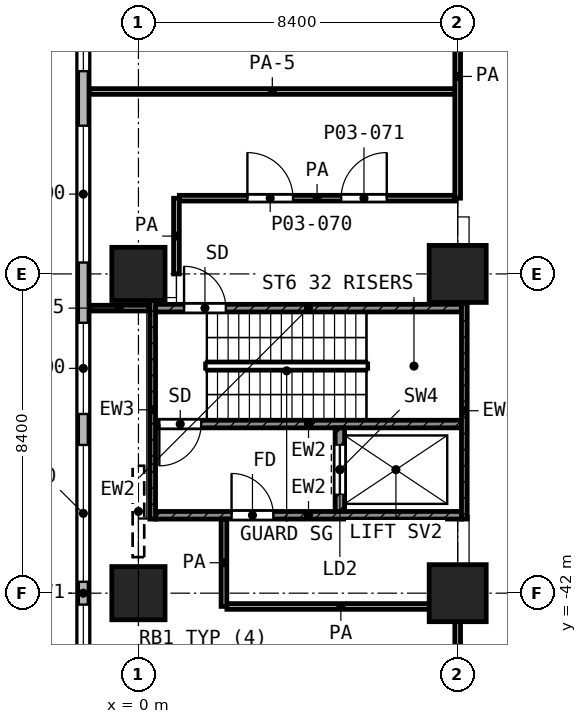
"""IFC4 building model, lengths in metres.
Left out: names, types, materials, properties, quantities, classifications, styles, units other than length and angle.
Written with IfcOpenShell. Run it as: python <this file> out.ifc"""

import sys

from ifc_helpers import new_model, si_unit, direction, frame, frame_2d, origin, origin_2d, place, context, subcontext, project, spatial, rectangle, extrude, element, fill, save


model = new_model("IFC4")
c1 = context("Model", 3, precision=1e-05, world=origin(), true_north=direction((0.0, 1.0)))
c2 = subcontext(c1, "Body", "Model", "MODEL_VIEW")
j1 = project(units=[si_unit("LENGTHUNIT", "METRE"), si_unit("PLANEANGLEUNIT", "RADIAN")], contexts=[c1])
p1 = place(None, origin())
s1 = spatial("IfcSite", under=j1, at=p1, CompositionType="ELEMENT")
p2 = place(p1, origin())
s2 = spatial("IfcBuilding", under=s1, at=p2, CompositionType="ELEMENT")
p3 = place(p2, frame((0.0, 0.0, 12.6)))
s3 = spatial("IfcBuildingStorey", under=s2, at=p3, CompositionType="ELEMENT", Elevation=12.6)
p4 = place(p3, frame((0.0, -33.6, 0.0), z_axis=(0.0, 0.0, 1.0), x_axis=(1.0, 0.0, 0.0)))
e1 = element("IfcColumn", 1, at=p4, inside=s3, PredefinedType="COLUMN", context=c2, shape_type="SweptSolid", body=[
    extrude(rectangle(XDim=1.4, YDim=1.4, at=origin_2d()), origin(), (0.0, 0.0, 1.0), 5.6),
])
p5 = place(p3, frame((8.4, -33.6, 0.0), z_axis=(0.0, 0.0, 1.0), x_axis=(1.0, 0.0, 0.0)))
e2 = element("IfcColumn", 2, at=p5, inside=s3, PredefinedType="COLUMN", context=c2, shape_type="SweptSolid", body=[
    extrude(rectangle(XDim=1.5, YDim=1.5, at=origin_2d()), origin(), (0.0, 0.0, 1.0), 5.6),
])
p6 = place(p3, frame((0.0, -42.0, 0.0), z_axis=(0.0, 0.0, 1.0), x_axis=(1.0, 0.0, 0.0)))
e3 = element("IfcColumn", 3, at=p6, inside=s3, PredefinedType="COLUMN", context=c2, shape_type="SweptSolid", body=[
    extrude(rectangle(XDim=1.4, YDim=1.4, at=origin_2d()), origin(), (0.0, 0.0, 1.0), 5.6),
])
p7 = place(p3, frame((8.4, -42.0, 0.0), z_axis=(0.0, 0.0, 1.0), x_axis=(1.0, 0.0, 0.0)))
e4 = element("IfcColumn", 4, at=p7, inside=s3, PredefinedType="COLUMN", context=c2, shape_type="SweptSolid", body=[
    extrude(rectangle(XDim=1.5, YDim=1.5, at=origin_2d()), origin(), (0.0, 0.0, 1.0), 5.6),
])
p8 = place(p3, frame((-1.45, -4.462, 0.0), z_axis=(0.0, 0.0, 1.0), x_axis=(0.0, -1.0, 0.0)))
e5 = element("IfcWall", 5, at=p8, inside=s3, PredefinedType="SOLIDWALL", context=c2, shape_type="SweptSolid", body=[
    extrude(rectangle(XDim=75.076, YDim=0.3, at=frame_2d((37.538, 0.0))), origin(), (0.0, 0.0, 1.0), 5.25),
])
p9 = place(p8, frame((0.738, 0.0, 0.9)))
e6 = element("IfcOpeningElement", 6, at=p9, cuts=e5, PredefinedType="OPENING", context=c2, shape_type="SweptSolid", body=[
    extrude(rectangle(XDim=2.4, YDim=3.0, at=frame_2d((1.2, 1.5))), frame((0.0, 0.16, 0.0), z_axis=(0.0, -1.0, 0.0), x_axis=(1.0, 0.0, 0.0)), (0.0, 0.0, 1.0), 0.32),
])
p10 = place(p8, frame((4.238, 0.0, 0.9)))
e7 = element("IfcOpeningElement", 7, at=p10, cuts=e5, PredefinedType="OPENING", context=c2, shape_type="SweptSolid", body=[
    extrude(rectangle(XDim=3.6, YDim=3.0, at=frame_2d((1.8, 1.5))), frame((0.0, 0.16, 0.0), z_axis=(0.0, -1.0, 0.0), x_axis=(1.0, 0.0, 0.0)), (0.0, 0.0, 1.0), 0.32),
])
p11 = place(p8, frame((8.438, 0.0, 0.9)))
e8 = element("IfcOpeningElement", 8, at=p11, cuts=e5, PredefinedType="OPENING", context=c2, shape_type="SweptSolid", body=[
    extrude(rectangle(XDim=3.6, YDim=3.0, at=frame_2d((1.8, 1.5))), frame((0.0, 0.16, 0.0), z_axis=(0.0, -1.0, 0.0), x_axis=(1.0, 0.0, 0.0)), (0.0, 0.0, 1.0), 0.32),
])
p12 = place(p8, frame((12.638, 0.0, 0.9)))
e9 = element("IfcOpeningElement", 9, at=p12, cuts=e5, PredefinedType="OPENING", context=c2, shape_type="SweptSolid", body=[
    extrude(rectangle(XDim=3.6, YDim=3.0, at=frame_2d((1.8, 1.5))), frame((0.0, 0.16, 0.0), z_axis=(0.0, -1.0, 0.0), x_axis=(1.0, 0.0, 0.0)), (0.0, 0.0, 1.0), 0.32),
])
p13 = place(p8, frame((16.838, 0.0, 0.9)))
e10 = element("IfcOpeningElement", 10, at=p13, cuts=e5, PredefinedType="OPENING", context=c2, shape_type="SweptSolid", body=[
    extrude(rectangle(XDim=3.6, YDim=3.0, at=frame_2d((1.8, 1.5))), frame((0.0, 0.16, 0.0), z_axis=(0.0, -1.0, 0.0), x_axis=(1.0, 0.0, 0.0)), (0.0, 0.0, 1.0), 0.32),
])
p14 = place(p8, frame((21.403, 0.0, 0.9)))
e11 = element("IfcOpeningElement", 11, at=p14, cuts=e5, PredefinedType="OPENING", context=c2, shape_type="SweptSolid", body=[
    extrude(rectangle(XDim=2.4, YDim=3.0, at=frame_2d((1.2, 1.5))), frame((0.0, 0.16, 0.0), z_axis=(0.0, -1.0, 0.0), x_axis=(1.0, 0.0, 0.0)), (0.0, 0.0, 1.0), 0.32),
])
p15 = place(p8, frame((25.238, 0.0, 0.9)))
e12 = element("IfcOpeningElement", 12, at=p15, cuts=e5, PredefinedType="OPENING", context=c2, shape_type="SweptSolid", body=[
    extrude(rectangle(XDim=3.6, YDim=3.0, at=frame_2d((1.8, 1.5))), frame((0.0, 0.16, 0.0), z_axis=(0.0, -1.0, 0.0), x_axis=(1.0, 0.0, 0.0)), (0.0, 0.0, 1.0), 0.32),
])
p16 = place(p8, frame((30.423, 0.0, 0.9)))
e13 = element("IfcOpeningElement", 13, at=p16, cuts=e5, PredefinedType="OPENING", context=c2, shape_type="SweptSolid", body=[
    extrude(rectangle(XDim=2.4, YDim=3.0, at=frame_2d((1.2, 1.5))), frame((0.0, 0.16, 0.0), z_axis=(0.0, -1.0, 0.0), x_axis=(1.0, 0.0, 0.0)), (0.0, 0.0, 1.0), 0.32),
])
p17 = place(p8, frame((33.638, 0.0, 0.9)))
e14 = element("IfcOpeningElement", 14, at=p17, cuts=e5, PredefinedType="OPENING", context=c2, shape_type="SweptSolid", body=[
    extrude(rectangle(XDim=3.6, YDim=3.0, at=frame_2d((1.8, 1.5))), frame((0.0, 0.16, 0.0), z_axis=(0.0, -1.0, 0.0), x_axis=(1.0, 0.0, 0.0)), (0.0, 0.0, 1.0), 0.32),
])
p18 = place(p8, frame((37.838, 0.0, 0.9)))
e15 = element("IfcOpeningElement", 15, at=p18, cuts=e5, PredefinedType="OPENING", context=c2, shape_type="SweptSolid", body=[
    extrude(rectangle(XDim=3.6, YDim=3.0, at=frame_2d((1.8, 1.5))), frame((0.0, 0.16, 0.0), z_axis=(0.0, -1.0, 0.0), x_axis=(1.0, 0.0, 0.0)), (0.0, 0.0, 1.0), 0.32),
])
p19 = place(p8, frame((42.038, 0.0, 0.9)))
e16 = element("IfcOpeningElement", 16, at=p19, cuts=e5, PredefinedType="OPENING", context=c2, shape_type="SweptSolid", body=[
    extrude(rectangle(XDim=3.6, YDim=3.0, at=frame_2d((1.8, 1.5))), frame((0.0, 0.16, 0.0), z_axis=(0.0, -1.0, 0.0), x_axis=(1.0, 0.0, 0.0)), (0.0, 0.0, 1.0), 0.32),
])
p20 = place(p8, frame((46.238, 0.0, 0.9)))
e17 = element("IfcOpeningElement", 17, at=p20, cuts=e5, PredefinedType="OPENING", context=c2, shape_type="SweptSolid", body=[
    extrude(rectangle(XDim=3.6, YDim=3.0, at=frame_2d((1.8, 1.5))), frame((0.0, 0.16, 0.0), z_axis=(0.0, -1.0, 0.0), x_axis=(1.0, 0.0, 0.0)), (0.0, 0.0, 1.0), 0.32),
])
p21 = place(p8, frame((50.438, 0.0, 0.9)))
e18 = element("IfcOpeningElement", 18, at=p21, cuts=e5, PredefinedType="OPENING", context=c2, shape_type="SweptSolid", body=[
    extrude(rectangle(XDim=3.6, YDim=3.0, at=frame_2d((1.8, 1.5))), frame((0.0, 0.16, 0.0), z_axis=(0.0, -1.0, 0.0), x_axis=(1.0, 0.0, 0.0)), (0.0, 0.0, 1.0), 0.32),
])
p22 = place(p8, frame((54.638, 0.0, 0.9)))
e19 = element("IfcOpeningElement", 19, at=p22, cuts=e5, PredefinedType="OPENING", context=c2, shape_type="SweptSolid", body=[
    extrude(rectangle(XDim=3.6, YDim=3.0, at=frame_2d((1.8, 1.5))), frame((0.0, 0.16, 0.0), z_axis=(0.0, -1.0, 0.0), x_axis=(1.0, 0.0, 0.0)), (0.0, 0.0, 1.0), 0.32),
])
p23 = place(p8, frame((58.838, 0.0, 0.9)))
e20 = element("IfcOpeningElement", 20, at=p23, cuts=e5, PredefinedType="OPENING", context=c2, shape_type="SweptSolid", body=[
    extrude(rectangle(XDim=3.6, YDim=3.0, at=frame_2d((1.8, 1.5))), frame((0.0, 0.16, 0.0), z_axis=(0.0, -1.0, 0.0), x_axis=(1.0, 0.0, 0.0)), (0.0, 0.0, 1.0), 0.32),
])
p24 = place(p8, frame((63.038, 0.0, 0.9)))
e21 = element("IfcOpeningElement", 21, at=p24, cuts=e5, PredefinedType="OPENING", context=c2, shape_type="SweptSolid", body=[
    extrude(rectangle(XDim=3.6, YDim=3.0, at=frame_2d((1.8, 1.5))), frame((0.0, 0.16, 0.0), z_axis=(0.0, -1.0, 0.0), x_axis=(1.0, 0.0, 0.0)), (0.0, 0.0, 1.0), 0.32),
])
p25 = place(p8, frame((67.603, 0.0, 0.9)))
e22 = element("IfcOpeningElement", 22, at=p25, cuts=e5, PredefinedType="OPENING", context=c2, shape_type="SweptSolid", body=[
    extrude(rectangle(XDim=1.2, YDim=3.0, at=frame_2d((0.6, 1.5))), frame((0.0, 0.16, 0.0), z_axis=(0.0, -1.0, 0.0), x_axis=(1.0, 0.0, 0.0)), (0.0, 0.0, 1.0), 0.32),
])
p26 = place(p8, frame((71.938, 0.0, 0.9)))
e23 = element("IfcOpeningElement", 23, at=p26, cuts=e5, PredefinedType="OPENING", context=c2, shape_type="SweptSolid", body=[
    extrude(rectangle(XDim=2.4, YDim=3.0, at=frame_2d((1.2, 1.5))), frame((0.0, 0.16, 0.0), z_axis=(0.0, -1.0, 0.0), x_axis=(1.0, 0.0, 0.0)), (0.0, 0.0, 1.0), 0.32),
])
p27 = place(p3, frame((0.375, -40.05, 0.0), z_axis=(0.0, 0.0, 1.0), x_axis=(0.0, 1.0, 0.0)))
e24 = element("IfcWall", 24, at=p27, inside=s3, PredefinedType="SHEAR", context=c2, shape_type="SweptSolid", body=[
    extrude(rectangle(XDim=5.75, YDim=0.15, at=frame_2d((2.875, 0.0))), origin(), (0.0, 0.0, 1.0), 5.25),
])
p28 = place(p3, frame((8.575, -40.05, 0.0), z_axis=(0.0, 0.0, 1.0), x_axis=(0.0, 1.0, 0.0)))
e25 = element("IfcWall", 25, at=p28, inside=s3, PredefinedType="SHEAR", context=c2, shape_type="SweptSolid", body=[
    extrude(rectangle(XDim=5.7, YDim=0.15, at=frame_2d((2.85, 0.0))), origin(), (0.0, 0.0, 1.0), 5.25),
])
p29 = place(p3, frame((0.45, -34.5, 0.0), z_axis=(0.0, 0.0, 1.0), x_axis=(1.0, 0.0, 0.0)))
e26 = element("IfcWall", 26, at=p29, inside=s3, PredefinedType="SHEAR", context=c2, shape_type="SweptSolid", body=[
    extrude(rectangle(XDim=8.05, YDim=0.2, at=frame_2d((4.025, 0.0))), origin(), (0.0, 0.0, 1.0), 5.25),
])
p30 = place(p29, frame((0.75, 0.0, 0.0)))
e27 = element("IfcOpeningElement", 27, at=p30, cuts=e26, PredefinedType="OPENING", context=c2, shape_type="SweptSolid", body=[
    extrude(rectangle(XDim=1.1, YDim=2.1, at=frame_2d((0.55, 1.05))), frame((0.0, 0.11, 0.0), z_axis=(0.0, -1.0, 0.0), x_axis=(1.0, 0.0, 0.0)), (0.0, 0.0, 1.0), 0.22),
])
p31 = place(p3, frame((0.45, -37.55, 0.0), z_axis=(0.0, 0.0, 1.0), x_axis=(1.0, 0.0, 0.0)))
e28 = element("IfcWall", 28, at=p31, inside=s3, PredefinedType="SHEAR", context=c2, shape_type="SweptSolid", body=[
    extrude(rectangle(XDim=8.05, YDim=0.2, at=frame_2d((4.025, 0.0))), origin(), (0.0, 0.0, 1.0), 5.25),
])
p32 = place(p31, frame((0.1, 0.0, 0.0)))
e29 = element("IfcOpeningElement", 29, at=p32, cuts=e28, PredefinedType="OPENING", context=c2, shape_type="SweptSolid", body=[
    extrude(rectangle(XDim=1.1, YDim=2.1, at=frame_2d((0.55, 1.05))), frame((0.0, 0.11, 0.0), z_axis=(0.0, -1.0, 0.0), x_axis=(1.0, 0.0, 0.0)), (0.0, 0.0, 1.0), 0.22),
])
p33 = place(p3, frame((0.45, -39.95, 0.0), z_axis=(0.0, 0.0, 1.0), x_axis=(1.0, 0.0, 0.0)))
e30 = element("IfcWall", 30, at=p33, inside=s3, PredefinedType="SHEAR", context=c2, shape_type="SweptSolid", body=[
    extrude(rectangle(XDim=8.05, YDim=0.2, at=frame_2d((4.025, 0.0))), origin(), (0.0, 0.0, 1.0), 5.25),
])
p34 = place(p33, frame((2.0, 0.0, 0.0)))
e31 = element("IfcOpeningElement", 31, at=p34, cuts=e30, PredefinedType="OPENING", context=c2, shape_type="SweptSolid", body=[
    extrude(rectangle(XDim=1.1, YDim=2.1, at=frame_2d((0.55, 1.05))), frame((0.0, 0.11, 0.0), z_axis=(0.0, -1.0, 0.0), x_axis=(1.0, 0.0, 0.0)), (0.0, 0.0, 1.0), 0.22),
])
p35 = place(p3, frame((5.3, -39.85, 0.0), z_axis=(0.0, 0.0, 1.0), x_axis=(0.0, 1.0, 0.0)))
e32 = element("IfcWall", 32, at=p35, inside=s3, PredefinedType="SHEAR", context=c2, shape_type="SweptSolid", body=[
    extrude(rectangle(XDim=2.2, YDim=0.25, at=frame_2d((1.1, 0.0))), origin(), (0.0, 0.0, 1.0), 5.25),
])
p36 = place(p35, frame((0.45, 0.0, 0.0)))
e33 = element("IfcOpeningElement", 33, at=p36, cuts=e32, PredefinedType="OPENING", context=c2, shape_type="SweptSolid", body=[
    extrude(rectangle(XDim=1.3, YDim=2.1, at=frame_2d((0.65, 1.05))), frame((0.0, 0.135, 0.0), z_axis=(0.0, -1.0, 0.0), x_axis=(1.0, 0.0, 0.0)), (0.0, 0.0, 1.0), 0.27),
])
p37 = place(p3, frame((2.327, -42.35, 0.0), z_axis=(0.0, 0.0, 1.0), x_axis=(1.0, 0.0, 0.0)))
e34 = element("IfcWall", 34, at=p37, inside=s3, PredefinedType="PARTITIONING", context=c2, shape_type="SweptSolid", body=[
    extrude(rectangle(XDim=5.998, YDim=0.15, at=frame_2d((2.999, 0.0))), origin(), (0.0, 0.0, 1.0), 5.25),
])
p38 = place(p3, frame((-1.28, -34.5, 0.0), z_axis=(0.0, 0.0, 1.0), x_axis=(1.0, 0.0, 0.0)))
e35 = element("IfcWall", 35, at=p38, inside=s3, PredefinedType="PARTITIONING", context=c2, shape_type="SweptSolid", body=[
    extrude(rectangle(XDim=1.55, YDim=0.15, at=frame_2d((0.775, 0.0))), origin(), (0.0, 0.0, 1.0), 3.85),
])
p39 = place(p3, frame((1.076, -31.607, 0.0), z_axis=(0.0, 0.0, 1.0), x_axis=(1.0, 0.0, 0.0)))
e36 = element("IfcWall", 36, at=p39, inside=s3, PredefinedType="PARTITIONING", context=c2, shape_type="SweptSolid", body=[
    extrude(rectangle(XDim=7.249, YDim=0.15, at=frame_2d((3.625, 0.0))), origin(), (0.0, 0.0, 1.0), 5.25),
])
p40 = place(p39, frame((1.791, 0.0, 0.0)))
e37 = element("IfcOpeningElement", 37, at=p40, cuts=e36, PredefinedType="OPENING", context=c2, shape_type="SweptSolid", body=[
    extrude(rectangle(XDim=1.2, YDim=2.1, at=frame_2d((0.6, 1.05))), frame((0.0, 0.085, 0.0), z_axis=(0.0, -1.0, 0.0), x_axis=(1.0, 0.0, 0.0)), (0.0, 0.0, 1.0), 0.17),
])
p41 = place(p39, frame((4.258, 0.0, 0.0)))
e38 = element("IfcOpeningElement", 38, at=p41, cuts=e36, PredefinedType="OPENING", context=c2, shape_type="SweptSolid", body=[
    extrude(rectangle(XDim=1.2, YDim=2.1, at=frame_2d((0.6, 1.05))), frame((0.0, 0.085, 0.0), z_axis=(0.0, -1.0, 0.0), x_axis=(1.0, 0.0, 0.0)), (0.0, 0.0, 1.0), 0.17),
])
p42 = place(p3, frame((-1.28, -28.8, 0.0), z_axis=(0.0, 0.0, 1.0), x_axis=(1.0, 0.0, 0.0)))
e39 = element("IfcWall", 39, at=p42, inside=s3, PredefinedType="PARTITIONING", context=c2, shape_type="SweptSolid", body=[
    extrude(rectangle(XDim=9.605, YDim=0.15, at=frame_2d((4.802, 0.0))), origin(), (0.0, 0.0, 1.0), 3.85),
])
p43 = place(p3, frame((1.0, -33.6, 0.0), z_axis=(0.0, 0.0, 1.0), x_axis=(0.0, 1.0, 0.0)))
e40 = element("IfcWall", 40, at=p43, inside=s3, PredefinedType="PARTITIONING", context=c2, shape_type="SweptSolid", body=[
    extrude(rectangle(XDim=1.991, YDim=0.15, at=frame_2d((0.996, 0.0))), origin(), (0.0, 0.0, 1.0), 5.25),
])
p44 = place(p3, frame((2.25, -42.348, 0.0), z_axis=(0.0, 0.0, 1.0), x_axis=(0.0, 1.0, 0.0)))
e41 = element("IfcWall", 41, at=p44, inside=s3, PredefinedType="PARTITIONING", context=c2, shape_type="SweptSolid", body=[
    extrude(rectangle(XDim=2.298, YDim=0.15, at=frame_2d((1.149, 0.0))), origin(), (0.0, 0.0, 1.0), 5.25),
])
p45 = place(p3, frame((8.4, -67.947, 0.0), z_axis=(0.0, 0.0, 1.0), x_axis=(0.0, 1.0, 0.0)))
e42 = element("IfcWall", 42, at=p45, inside=s3, PredefinedType="PARTITIONING", context=c2, shape_type="SweptSolid", body=[
    extrude(rectangle(XDim=25.597, YDim=0.15, at=frame_2d((12.798, 0.0))), origin(), (0.0, 0.0, 1.0), 5.25),
])
p46 = place(p45, frame((18.809, 0.0, 0.0)))
e43 = element("IfcOpeningElement", 43, at=p46, cuts=e42, PredefinedType="OPENING", context=c2, shape_type="SweptSolid", body=[
    extrude(rectangle(XDim=1.5, YDim=2.1, at=frame_2d((0.75, 1.05))), frame((0.0, 0.085, 0.0), z_axis=(0.0, -1.0, 0.0), x_axis=(1.0, 0.0, 0.0)), (0.0, 0.0, 1.0), 0.17),
])
p47 = place(p45, frame((20.822, 0.0, 0.0)))
e44 = element("IfcOpeningElement", 44, at=p47, cuts=e42, PredefinedType="OPENING", context=c2, shape_type="SweptSolid", body=[
    extrude(rectangle(XDim=1.5, YDim=2.1, at=frame_2d((0.75, 1.05))), frame((0.0, 0.085, 0.0), z_axis=(0.0, -1.0, 0.0), x_axis=(1.0, 0.0, 0.0)), (0.0, 0.0, 1.0), 0.17),
])
p48 = place(p45, frame((22.835, 0.0, 0.0)))
e45 = element("IfcOpeningElement", 45, at=p48, cuts=e42, PredefinedType="OPENING", context=c2, shape_type="SweptSolid", body=[
    extrude(rectangle(XDim=1.5, YDim=2.1, at=frame_2d((0.75, 1.05))), frame((0.0, 0.085, 0.0), z_axis=(0.0, -1.0, 0.0), x_axis=(1.0, 0.0, 0.0)), (0.0, 0.0, 1.0), 0.17),
])
p49 = place(p45, frame((10.497, 0.0, 0.0)))
e46 = element("IfcOpeningElement", 46, at=p49, cuts=e42, PredefinedType="OPENING", context=c2, shape_type="SweptSolid", body=[
    extrude(rectangle(XDim=1.5, YDim=2.1, at=frame_2d((0.75, 1.05))), frame((0.0, 0.085, 0.0), z_axis=(0.0, -1.0, 0.0), x_axis=(1.0, 0.0, 0.0)), (0.0, 0.0, 1.0), 0.17),
])
p50 = place(p45, frame((12.597, 0.0, 0.0)))
e47 = element("IfcOpeningElement", 47, at=p50, cuts=e42, PredefinedType="OPENING", context=c2, shape_type="SweptSolid", body=[
    extrude(rectangle(XDim=1.5, YDim=2.1, at=frame_2d((0.75, 1.05))), frame((0.0, 0.085, 0.0), z_axis=(0.0, -1.0, 0.0), x_axis=(1.0, 0.0, 0.0)), (0.0, 0.0, 1.0), 0.17),
])
p51 = place(p45, frame((14.697, 0.0, 0.0)))
e48 = element("IfcOpeningElement", 48, at=p51, cuts=e42, PredefinedType="OPENING", context=c2, shape_type="SweptSolid", body=[
    extrude(rectangle(XDim=1.5, YDim=2.1, at=frame_2d((0.75, 1.05))), frame((0.0, 0.085, 0.0), z_axis=(0.0, -1.0, 0.0), x_axis=(1.0, 0.0, 0.0)), (0.0, 0.0, 1.0), 0.17),
])
p52 = place(p45, frame((1.537, 0.0, 0.0)))
e49 = element("IfcOpeningElement", 49, at=p52, cuts=e42, PredefinedType="OPENING", context=c2, shape_type="SweptSolid", body=[
    extrude(rectangle(XDim=1.5, YDim=2.1, at=frame_2d((0.75, 1.05))), frame((0.0, 0.085, 0.0), z_axis=(0.0, -1.0, 0.0), x_axis=(1.0, 0.0, 0.0)), (0.0, 0.0, 1.0), 0.17),
])
p53 = place(p45, frame((3.823, 0.0, 0.0)))
e50 = element("IfcOpeningElement", 50, at=p53, cuts=e42, PredefinedType="OPENING", context=c2, shape_type="SweptSolid", body=[
    extrude(rectangle(XDim=1.5, YDim=2.1, at=frame_2d((0.75, 1.05))), frame((0.0, 0.085, 0.0), z_axis=(0.0, -1.0, 0.0), x_axis=(1.0, 0.0, 0.0)), (0.0, 0.0, 1.0), 0.17),
])
p54 = place(p45, frame((6.11, 0.0, 0.0)))
e51 = element("IfcOpeningElement", 51, at=p54, cuts=e42, PredefinedType="OPENING", context=c2, shape_type="SweptSolid", body=[
    extrude(rectangle(XDim=1.5, YDim=2.1, at=frame_2d((0.75, 1.05))), frame((0.0, 0.085, 0.0), z_axis=(0.0, -1.0, 0.0), x_axis=(1.0, 0.0, 0.0)), (0.0, 0.0, 1.0), 0.17),
])
p55 = place(p3, frame((8.4, -31.607, 0.0), z_axis=(0.0, 0.0, 1.0), x_axis=(0.0, 1.0, 0.0)))
e52 = element("IfcWall", 52, at=p55, inside=s3, PredefinedType="PARTITIONING", context=c2, shape_type="SweptSolid", body=[
    extrude(rectangle(XDim=6.407, YDim=0.15, at=frame_2d((3.204, 0.0))), origin(), (0.0, 0.0, 1.0), 5.25),
])
p56 = place(p55, frame((4.007, 0.0, 0.0)))
e53 = element("IfcOpeningElement", 53, at=p56, cuts=e52, PredefinedType="OPENING", context=c2, shape_type="SweptSolid", body=[
    extrude(rectangle(XDim=1.2, YDim=2.1, at=frame_2d((0.6, 1.05))), frame((0.0, 0.085, 0.0), z_axis=(0.0, -1.0, 0.0), x_axis=(1.0, 0.0, 0.0)), (0.0, 0.0, 1.0), 0.17),
])
p57 = place(p14, origin())
e54 = element("IfcWindow", 54, at=p57, inside=s3, PartitioningType="SINGLE_PANEL", PredefinedType="WINDOW", context=c2, shape_type="SweptSolid", body=[
    extrude(rectangle(XDim=2.4, YDim=3.0, at=frame_2d((1.2, 1.5))), frame((0.0, 0.03, 0.0), z_axis=(0.0, -1.0, 0.0), x_axis=(1.0, 0.0, 0.0)), (0.0, 0.0, 1.0), 0.06),
])
fill(e11, e54)
p58 = place(p15, origin())
e55 = element("IfcWindow", 55, at=p58, inside=s3, PartitioningType="SINGLE_PANEL", PredefinedType="WINDOW", context=c2, shape_type="SweptSolid", body=[
    extrude(rectangle(XDim=3.6, YDim=3.0, at=frame_2d((1.8, 1.5))), frame((0.0, 0.03, 0.0), z_axis=(0.0, -1.0, 0.0), x_axis=(1.0, 0.0, 0.0)), (0.0, 0.0, 1.0), 0.06),
])
fill(e12, e55)
p59 = place(p16, origin())
e56 = element("IfcWindow", 56, at=p59, inside=s3, PartitioningType="SINGLE_PANEL", PredefinedType="WINDOW", context=c2, shape_type="SweptSolid", body=[
    extrude(rectangle(XDim=2.4, YDim=3.0, at=frame_2d((1.2, 1.5))), frame((0.0, 0.03, 0.0), z_axis=(0.0, -1.0, 0.0), x_axis=(1.0, 0.0, 0.0)), (0.0, 0.0, 1.0), 0.06),
])
fill(e13, e56)
p60 = place(p17, origin())
e57 = element("IfcWindow", 57, at=p60, inside=s3, PartitioningType="SINGLE_PANEL", PredefinedType="WINDOW", context=c2, shape_type="SweptSolid", body=[
    extrude(rectangle(XDim=3.6, YDim=3.0, at=frame_2d((1.8, 1.5))), frame((0.0, 0.03, 0.0), z_axis=(0.0, -1.0, 0.0), x_axis=(1.0, 0.0, 0.0)), (0.0, 0.0, 1.0), 0.06),
])
fill(e14, e57)
p61 = place(p18, origin())
e58 = element("IfcWindow", 58, at=p61, inside=s3, PartitioningType="SINGLE_PANEL", PredefinedType="WINDOW", context=c2, shape_type="SweptSolid", body=[
    extrude(rectangle(XDim=3.6, YDim=3.0, at=frame_2d((1.8, 1.5))), frame((0.0, 0.03, 0.0), z_axis=(0.0, -1.0, 0.0), x_axis=(1.0, 0.0, 0.0)), (0.0, 0.0, 1.0), 0.06),
])
fill(e15, e58)
p62 = place(p30, origin())
e59 = element("IfcDoor", 59, at=p62, inside=s3, OperationType="SINGLE_SWING_LEFT", PredefinedType="DOOR", context=c2, shape_type="SweptSolid", body=[
    extrude(rectangle(XDim=1.1, YDim=2.1, at=frame_2d((0.55, 1.05))), frame((0.0, 0.025, 0.0), z_axis=(0.0, -1.0, 0.0), x_axis=(1.0, 0.0, 0.0)), (0.0, 0.0, 1.0), 0.05),
])
fill(e27, e59)
p63 = place(p32, frame((1.1, 0.0, 0.0), z_axis=(0.0, 0.0, 1.0), x_axis=(-1.0, 0.0, 0.0)))
e60 = element("IfcDoor", 60, at=p63, inside=s3, OperationType="SINGLE_SWING_LEFT", PredefinedType="DOOR", context=c2, shape_type="SweptSolid", body=[
    extrude(rectangle(XDim=1.1, YDim=2.1, at=frame_2d((0.55, 1.05))), frame((0.0, 0.025, 0.0), z_axis=(0.0, -1.0, 0.0), x_axis=(1.0, 0.0, 0.0)), (0.0, 0.0, 1.0), 0.05),
])
fill(e29, e60)
p64 = place(p36, origin())
e61 = element("IfcDoor", 61, at=p64, inside=s3, OperationType="DOUBLE_DOOR_SLIDING", PredefinedType="DOOR", context=c2, shape_type="SweptSolid", body=[
    extrude(rectangle(XDim=1.3, YDim=2.1, at=frame_2d((0.65, 1.05))), frame((0.0, 0.025, 0.0), z_axis=(0.0, -1.0, 0.0), x_axis=(1.0, 0.0, 0.0)), (0.0, 0.0, 1.0), 0.05),
])
fill(e33, e61)
p65 = place(p34, origin())
e62 = element("IfcDoor", 62, at=p65, inside=s3, OperationType="SINGLE_SWING_LEFT", PredefinedType="DOOR", context=c2, shape_type="SweptSolid", body=[
    extrude(rectangle(XDim=1.1, YDim=2.1, at=frame_2d((0.55, 1.05))), frame((0.0, 0.025, 0.0), z_axis=(0.0, -1.0, 0.0), x_axis=(1.0, 0.0, 0.0)), (0.0, 0.0, 1.0), 0.05),
])
fill(e31, e62)
p66 = place(p40, origin())
e63 = element("IfcDoor", 63, at=p66, inside=s3, OperationType="SINGLE_SWING_LEFT", PredefinedType="DOOR", context=c2, shape_type="SweptSolid", body=[
    extrude(rectangle(XDim=1.2, YDim=2.1, at=frame_2d((0.6, 1.05))), frame((0.0, 0.025, 0.0), z_axis=(0.0, -1.0, 0.0), x_axis=(1.0, 0.0, 0.0)), (0.0, 0.0, 1.0), 0.05),
])
fill(e37, e63)
p67 = place(p41, origin())
e64 = element("IfcDoor", 64, at=p67, inside=s3, OperationType="SINGLE_SWING_RIGHT", PredefinedType="DOOR", context=c2, shape_type="SweptSolid", body=[
    extrude(rectangle(XDim=1.2, YDim=2.1, at=frame_2d((0.6, 1.05))), frame((0.0, 0.025, 0.0), z_axis=(0.0, -1.0, 0.0), x_axis=(1.0, 0.0, 0.0)), (0.0, 0.0, 1.0), 0.05),
])
fill(e38, e64)
save(model, sys.argv[1])
